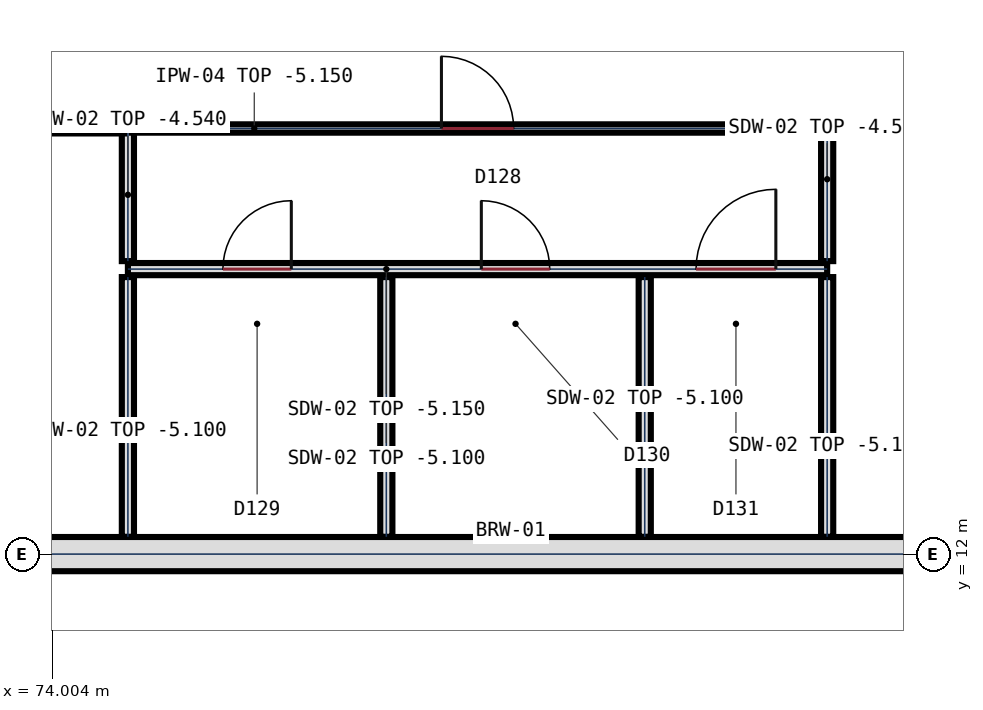
"""IFC4 building model, lengths in metres.
Left out: names, types, materials, properties, quantities, classifications, styles, units other than length and angle.
Written with IfcOpenShell. Run it as: python <this file> out.ifc"""

import sys

from ifc_helpers import new_model, si_unit, direction, frame, frame_2d, origin, place, context, subcontext, project, spatial, rectangle, extrude, element, fill, save


model = new_model("IFC4")
c1 = context("Model", 3, precision=1e-05, world=origin(), true_north=direction((0.0, 1.0)))
c2 = subcontext(c1, "Body", "Model", "MODEL_VIEW")
j1 = project(units=[si_unit("LENGTHUNIT", "METRE"), si_unit("PLANEANGLEUNIT", "RADIAN")], contexts=[c1])
p1 = place(None, origin())
s1 = spatial("IfcSite", under=j1, at=p1, CompositionType="ELEMENT")
p2 = place(p1, origin())
s2 = spatial("IfcBuilding", under=s1, at=p2, CompositionType="ELEMENT")
p3 = place(p2, frame((0.0, 0.0, -8.4)))
s3 = spatial("IfcBuildingStorey", under=s2, at=p3, CompositionType="ELEMENT", Elevation=-8.4)
p4 = place(p3, frame((86.402, 12.0, 0.0), z_axis=(0.0, 0.0, 1.0), x_axis=(-1.0, 0.0, 0.0)))
e1 = element("IfcWall", 1, at=p4, inside=s3, PredefinedType="USERDEFINED", context=c2, shape_type="SweptSolid", body=[
    extrude(rectangle(XDim=12.729, YDim=0.45, at=frame_2d((6.365, 0.0))), origin(), (0.0, 0.0, 1.0), 3.86),
])
p5 = place(p3, frame((75.0, 15.75, 0.0), z_axis=(0.0, 0.0, 1.0), x_axis=(1.0, 0.0, 0.0)))
e2 = element("IfcWall", 2, at=p5, inside=s3, PredefinedType="PLUMBINGWALL", context=c2, shape_type="SweptSolid", body=[
    extrude(rectangle(XDim=9.2, YDim=0.16, at=frame_2d((4.6, 0.0))), origin(), (0.0, 0.0, 1.0), 3.25),
])
p6 = place(p5, frame((1.25, 0.0, 0.0)))
e3 = element("IfcOpeningElement", 3, at=p6, cuts=e2, PredefinedType="OPENING", context=c2, shape_type="SweptSolid", body=[
    extrude(rectangle(XDim=0.9, YDim=2.1, at=frame_2d((0.45, 1.05))), frame((0.0, 0.09, 0.0), z_axis=(0.0, -1.0, 0.0), x_axis=(1.0, 0.0, 0.0)), (0.0, 0.0, 1.0), 0.18),
])
p7 = place(p5, frame((4.65, 0.0, 0.0)))
e4 = element("IfcOpeningElement", 4, at=p7, cuts=e2, PredefinedType="OPENING", context=c2, shape_type="SweptSolid", body=[
    extrude(rectangle(XDim=0.9, YDim=2.1, at=frame_2d((0.45, 1.05))), frame((0.0, 0.09, 0.0), z_axis=(0.0, -1.0, 0.0), x_axis=(1.0, 0.0, 0.0)), (0.0, 0.0, 1.0), 0.18),
])
p8 = place(p5, frame((7.475, 0.0, 0.0)))
e5 = element("IfcOpeningElement", 5, at=p8, cuts=e2, PredefinedType="OPENING", context=c2, shape_type="SweptSolid", body=[
    extrude(rectangle(XDim=1.05, YDim=2.15, at=frame_2d((0.525, 1.075))), frame((0.0, 0.09, 0.0), z_axis=(0.0, -1.0, 0.0), x_axis=(1.0, 0.0, 0.0)), (0.0, 0.0, 1.0), 0.18),
])
p9 = place(p3, frame((75.0, 12.228, 0.0), z_axis=(0.0, 0.0, 1.0), x_axis=(0.0, 1.0, 0.0)))
e6 = element("IfcWall", 6, at=p9, inside=s3, PredefinedType="PLUMBINGWALL", context=c2, shape_type="SweptSolid", body=[
    extrude(rectangle(XDim=3.417, YDim=0.16, at=frame_2d((1.708, 0.0))), origin(), (0.0, 0.0, 1.0), 3.3),
])
p10 = place(p3, frame((75.0, 15.855, 0.0), z_axis=(0.0, 0.0, 1.0), x_axis=(0.0, 1.0, 0.0)))
e7 = element("IfcWall", 7, at=p10, inside=s3, PredefinedType="PLUMBINGWALL", context=c2, shape_type="SweptSolid", body=[
    extrude(rectangle(XDim=1.745, YDim=0.16, at=frame_2d((0.873, 0.0))), origin(), (0.0, 0.0, 1.0), 3.86),
])
for number, where, z_axis, x_axis in (
    (8, (78.4, 12.228, 0.0), (0.0, 0.0, 1.0), (0.0, 1.0, 0.0)),
    (9, (81.8, 12.228, 0.0), (0.0, 0.0, 1.0), (0.0, 1.0, 0.0)),
    (10, (84.2, 12.228, 0.0), (0.0, 0.0, 1.0), (0.0, 1.0, 0.0)),
):
    element("IfcWall", number, at=place(p3, frame(where, z_axis=z_axis, x_axis=x_axis)), inside=s3, PredefinedType="PLUMBINGWALL", context=c2, shape_type="SweptSolid", body=[
        extrude(rectangle(XDim=3.417, YDim=0.16, at=frame_2d((1.708, 0.0))), origin(), (0.0, 0.0, 1.0), 3.3),
    ])
p11 = place(p3, frame((84.2, 15.855, 0.0), z_axis=(0.0, 0.0, 1.0), x_axis=(0.0, 1.0, 0.0)))
e11 = element("IfcWall", 11, at=p11, inside=s3, PredefinedType="PLUMBINGWALL", context=c2, shape_type="SweptSolid", body=[
    extrude(rectangle(XDim=1.745, YDim=0.16, at=frame_2d((0.873, 0.0))), origin(), (0.0, 0.0, 1.0), 3.86),
])
p12 = place(p3, frame((84.25, 17.6, 0.0), z_axis=(0.0, 0.0, 1.0), x_axis=(1.0, 0.0, 0.0)))
e12 = element("IfcWall", 12, at=p12, inside=s3, PredefinedType="PARTITIONING", context=c2, shape_type="SweptSolid", body=[
    extrude(rectangle(XDim=40.55, YDim=0.19, at=frame_2d((20.275, 0.0))), origin(), (0.0, 0.0, 1.0), 2.9),
])
p13 = place(p12, frame((8.575, 0.0, 0.0)))
e13 = element("IfcOpeningElement", 13, at=p13, cuts=e12, PredefinedType="OPENING", context=c2, shape_type="SweptSolid", body=[
    extrude(rectangle(XDim=1.35, YDim=2.25, at=frame_2d((0.675, 1.125))), frame((0.0, 0.105, 0.0), z_axis=(0.0, -1.0, 0.0), x_axis=(1.0, 0.0, 0.0)), (0.0, 0.0, 1.0), 0.21),
])
p14 = place(p3, frame((19.28, 17.6, 0.0), z_axis=(0.0, 0.0, 1.0), x_axis=(1.0, 0.0, 0.0)))
e14 = element("IfcWall", 14, at=p14, inside=s3, PredefinedType="PARTITIONING", context=c2, shape_type="SweptSolid", body=[
    extrude(rectangle(XDim=55.67, YDim=0.13, at=frame_2d((27.835, 0.0))), origin(), (0.0, 0.0, 1.0), 2.95),
])
p15 = place(p14, frame((19.72, 0.0, 0.0)))
e15 = element("IfcOpeningElement", 15, at=p15, cuts=e14, PredefinedType="OPENING", context=c2, shape_type="SweptSolid", body=[
    extrude(rectangle(XDim=1.0, YDim=2.2, at=frame_2d((0.5, 1.1))), frame((0.0, 0.075, 0.0), z_axis=(0.0, -1.0, 0.0), x_axis=(1.0, 0.0, 0.0)), (0.0, 0.0, 1.0), 0.15),
])
p16 = place(p14, frame((46.62, 0.0, 0.0)))
e16 = element("IfcOpeningElement", 16, at=p16, cuts=e14, PredefinedType="OPENING", context=c2, shape_type="SweptSolid", body=[
    extrude(rectangle(XDim=1.0, YDim=2.2, at=frame_2d((0.5, 1.1))), frame((0.0, 0.075, 0.0), z_axis=(0.0, -1.0, 0.0), x_axis=(1.0, 0.0, 0.0)), (0.0, 0.0, 1.0), 0.15),
])
p17 = place(p3, frame((75.05, 17.6, 0.0), z_axis=(0.0, 0.0, 1.0), x_axis=(1.0, 0.0, 0.0)))
e17 = element("IfcWall", 17, at=p17, inside=s3, PredefinedType="PARTITIONING", context=c2, shape_type="SweptSolid", body=[
    extrude(rectangle(XDim=9.1, YDim=0.11, at=frame_2d((4.55, 0.0))), origin(), (0.0, 0.0, 1.0), 3.25),
])
p18 = place(p17, frame((4.075, 0.0, 0.0)))
e18 = element("IfcOpeningElement", 18, at=p18, cuts=e17, PredefinedType="OPENING", context=c2, shape_type="SweptSolid", body=[
    extrude(rectangle(XDim=0.95, YDim=2.15, at=frame_2d((0.475, 1.075))), frame((0.0, 0.065, 0.0), z_axis=(0.0, -1.0, 0.0), x_axis=(1.0, 0.0, 0.0)), (0.0, 0.0, 1.0), 0.13),
])
p19 = place(p18, origin())
e19 = element("IfcDoor", 19, at=p19, inside=s3, OperationType="SINGLE_SWING_LEFT", PredefinedType="DOOR", context=c2, shape_type="SweptSolid", body=[
    extrude(rectangle(XDim=0.95, YDim=2.15, at=frame_2d((0.475, 1.075))), frame((0.0, 0.032, 0.0), z_axis=(0.0, -1.0, 0.0), x_axis=(1.0, 0.0, 0.0)), (0.0, 0.0, 1.0), 0.065),
])
fill(e18, e19)
p20 = place(p6, origin())
e20 = element("IfcDoor", 20, at=p20, inside=s3, OperationType="SINGLE_SWING_RIGHT", PredefinedType="DOOR", context=c2, shape_type="SweptSolid", body=[
    extrude(rectangle(XDim=0.9, YDim=2.1, at=frame_2d((0.45, 1.05))), frame((0.0, 0.032, 0.0), z_axis=(0.0, -1.0, 0.0), x_axis=(1.0, 0.0, 0.0)), (0.0, 0.0, 1.0), 0.065),
])
fill(e3, e20)
p21 = place(p7, origin())
e21 = element("IfcDoor", 21, at=p21, inside=s3, OperationType="SINGLE_SWING_LEFT", PredefinedType="DOOR", context=c2, shape_type="SweptSolid", body=[
    extrude(rectangle(XDim=0.9, YDim=2.1, at=frame_2d((0.45, 1.05))), frame((0.0, 0.032, 0.0), z_axis=(0.0, -1.0, 0.0), x_axis=(1.0, 0.0, 0.0)), (0.0, 0.0, 1.0), 0.065),
])
fill(e4, e21)
p22 = place(p8, origin())
e22 = element("IfcDoor", 22, at=p22, inside=s3, OperationType="SINGLE_SWING_RIGHT", PredefinedType="DOOR", context=c2, shape_type="SweptSolid", body=[
    extrude(rectangle(XDim=1.05, YDim=2.15, at=frame_2d((0.525, 1.075))), frame((0.0, 0.032, 0.0), z_axis=(0.0, -1.0, 0.0), x_axis=(1.0, 0.0, 0.0)), (0.0, 0.0, 1.0), 0.065),
])
fill(e5, e22)
save(model, sys.argv[1])
